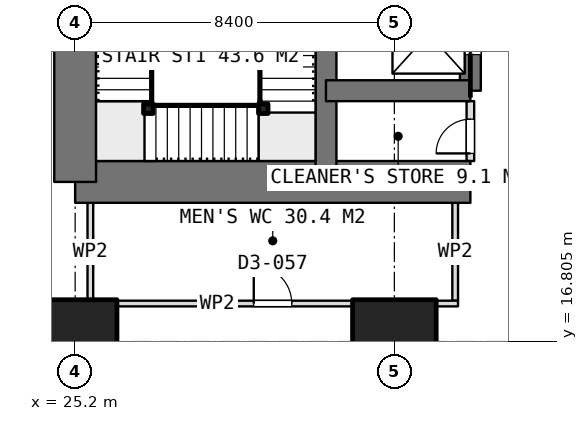
"""IFC4 building model, lengths in metres.
Left out: names, types, materials, properties, quantities, classifications, styles, units other than length and angle.
Written with IfcOpenShell. Run it as: python <this file> out.ifc"""

import sys

from ifc_helpers import new_model, si_unit, direction, frame, frame_2d, origin, origin_2d, place, context, subcontext, project, spatial, rectangle, extrude, element, fill, save


model = new_model("IFC4")
c1 = context("Model", 3, precision=1e-05, world=origin(), true_north=direction((0.0, 1.0)))
c2 = subcontext(c1, "Body", "Model", "MODEL_VIEW")
j1 = project(units=[si_unit("LENGTHUNIT", "METRE"), si_unit("PLANEANGLEUNIT", "RADIAN")], contexts=[c1])
p1 = place(None, origin())
s1 = spatial("IfcSite", under=j1, at=p1, CompositionType="ELEMENT")
p2 = place(p1, origin())
s2 = spatial("IfcBuilding", under=s1, at=p2, CompositionType="ELEMENT")
p3 = place(p2, frame((0.0, 0.0, 51.65)))
s3 = spatial("IfcBuildingStorey", under=s2, at=p3, CompositionType="ELEMENT", Elevation=51.65)
p4 = place(p3, frame((25.2, 21.0, 0.0), z_axis=(0.0, 0.0, 1.0), x_axis=(1.0, 0.0, 0.0)))
e1 = element("IfcWall", 1, at=p4, inside=s3, PredefinedType="SHEAR", context=c2, shape_type="SweptSolid", body=[
    extrude(rectangle(XDim=10.4, YDim=1.1, at=frame_2d((5.2, 0.0))), origin(), (0.0, 0.0, 1.0), 3.75),
])
p5 = place(p3, frame((25.2, 21.0, 0.0), z_axis=(0.0, 0.0, 1.0), x_axis=(0.0, 1.0, 0.0)))
e2 = element("IfcWall", 2, at=p5, inside=s3, PredefinedType="SHEAR", context=c2, shape_type="SweptSolid", body=[
    extrude(rectangle(XDim=25.2, YDim=1.1, at=frame_2d((12.6, 0.0))), origin(), (0.0, 0.0, 1.0), 3.75),
])
p6 = place(p5, frame((7.8, 0.0, 0.0)))
e3 = element("IfcOpeningElement", 3, at=p6, cuts=e2, PredefinedType="OPENING", context=c2, shape_type="SweptSolid", body=[
    extrude(rectangle(XDim=1.2, YDim=2.1, at=frame_2d((0.6, 1.05))), frame((0.0, 0.56, 0.0), z_axis=(0.0, -1.0, 0.0), x_axis=(1.0, 0.0, 0.0)), (0.0, 0.0, 1.0), 1.12),
])
p7 = place(p5, frame((14.25, 0.0, 0.0)))
e4 = element("IfcOpeningElement", 4, at=p7, cuts=e2, PredefinedType="OPENING", context=c2, shape_type="SweptSolid", body=[
    extrude(rectangle(XDim=0.9, YDim=2.1, at=frame_2d((0.45, 1.05))), frame((0.0, 0.56, 0.0), z_axis=(0.0, -1.0, 0.0), x_axis=(1.0, 0.0, 0.0)), (0.0, 0.0, 1.0), 1.12),
])
p8 = place(p5, frame((16.85, 0.0, 0.0)))
e5 = element("IfcOpeningElement", 5, at=p8, cuts=e2, PredefinedType="OPENING", context=c2, shape_type="SweptSolid", body=[
    extrude(rectangle(XDim=0.9, YDim=2.1, at=frame_2d((0.45, 1.05))), frame((0.0, 0.56, 0.0), z_axis=(0.0, -1.0, 0.0), x_axis=(1.0, 0.0, 0.0)), (0.0, 0.0, 1.0), 1.12),
])
p9 = place(p5, frame((19.075, 0.0, 0.0)))
e6 = element("IfcOpeningElement", 6, at=p9, cuts=e2, PredefinedType="OPENING", context=c2, shape_type="SweptSolid", body=[
    extrude(rectangle(XDim=1.2, YDim=2.1, at=frame_2d((0.6, 1.05))), frame((0.0, 0.56, 0.0), z_axis=(0.0, -1.0, 0.0), x_axis=(1.0, 0.0, 0.0)), (0.0, 0.0, 1.0), 1.12),
])
p10 = place(p3, frame((31.8, 21.0, 0.0), z_axis=(0.0, 0.0, 1.0), x_axis=(0.0, 1.0, 0.0)))
e7 = element("IfcWall", 7, at=p10, inside=s3, PredefinedType="SHEAR", context=c2, shape_type="SweptSolid", body=[
    extrude(rectangle(XDim=25.2, YDim=0.55, at=frame_2d((12.6, 0.0))), origin(), (0.0, 0.0, 1.0), 3.75),
])
p11 = place(p3, frame((35.6, 23.4, 0.0), z_axis=(0.0, 0.0, 1.0), x_axis=(0.0, 1.0, 0.0)))
e8 = element("IfcWall", 8, at=p11, inside=s3, PredefinedType="SHEAR", context=c2, shape_type="SweptSolid", body=[
    extrude(rectangle(XDim=18.0, YDim=0.55, at=frame_2d((9.0, 0.0))), origin(), (0.0, 0.0, 1.0), 3.75),
])
p12 = place(p11, frame((0.95, 0.0, 0.0)))
e9 = element("IfcOpeningElement", 9, at=p12, cuts=e8, PredefinedType="OPENING", context=c2, shape_type="SweptSolid", body=[
    extrude(rectangle(XDim=1.1, YDim=2.1, at=frame_2d((0.55, 1.05))), frame((0.0, 0.285, 0.0), z_axis=(0.0, -1.0, 0.0), x_axis=(1.0, 0.0, 0.0)), (0.0, 0.0, 1.0), 0.57),
])
p13 = place(p11, frame((3.95, 0.0, 0.0)))
e10 = element("IfcOpeningElement", 10, at=p13, cuts=e8, PredefinedType="OPENING", context=c2, shape_type="SweptSolid", body=[
    extrude(rectangle(XDim=1.1, YDim=2.1, at=frame_2d((0.55, 1.05))), frame((0.0, 0.285, 0.0), z_axis=(0.0, -1.0, 0.0), x_axis=(1.0, 0.0, 0.0)), (0.0, 0.0, 1.0), 0.57),
])
p14 = place(p11, frame((6.95, 0.0, 0.0)))
e11 = element("IfcOpeningElement", 11, at=p14, cuts=e8, PredefinedType="OPENING", context=c2, shape_type="SweptSolid", body=[
    extrude(rectangle(XDim=1.1, YDim=2.1, at=frame_2d((0.55, 1.05))), frame((0.0, 0.285, 0.0), z_axis=(0.0, -1.0, 0.0), x_axis=(1.0, 0.0, 0.0)), (0.0, 0.0, 1.0), 0.57),
])
p15 = place(p11, frame((9.95, 0.0, 0.0)))
e12 = element("IfcOpeningElement", 12, at=p15, cuts=e8, PredefinedType="OPENING", context=c2, shape_type="SweptSolid", body=[
    extrude(rectangle(XDim=1.1, YDim=2.1, at=frame_2d((0.55, 1.05))), frame((0.0, 0.285, 0.0), z_axis=(0.0, -1.0, 0.0), x_axis=(1.0, 0.0, 0.0)), (0.0, 0.0, 1.0), 0.57),
])
p16 = place(p11, frame((12.95, 0.0, 0.0)))
e13 = element("IfcOpeningElement", 13, at=p16, cuts=e8, PredefinedType="OPENING", context=c2, shape_type="SweptSolid", body=[
    extrude(rectangle(XDim=1.1, YDim=2.1, at=frame_2d((0.55, 1.05))), frame((0.0, 0.285, 0.0), z_axis=(0.0, -1.0, 0.0), x_axis=(1.0, 0.0, 0.0)), (0.0, 0.0, 1.0), 0.57),
])
p17 = place(p11, frame((15.95, 0.0, 0.0)))
e14 = element("IfcOpeningElement", 14, at=p17, cuts=e8, PredefinedType="OPENING", context=c2, shape_type="SweptSolid", body=[
    extrude(rectangle(XDim=1.1, YDim=2.1, at=frame_2d((0.55, 1.05))), frame((0.0, 0.285, 0.0), z_axis=(0.0, -1.0, 0.0), x_axis=(1.0, 0.0, 0.0)), (0.0, 0.0, 1.0), 0.57),
])
p18 = place(p3, frame((31.8, 23.4, 0.0), z_axis=(0.0, 0.0, 1.0), x_axis=(1.0, 0.0, 0.0)))
e15 = element("IfcWall", 15, at=p18, inside=s3, PredefinedType="SHEAR", context=c2, shape_type="SweptSolid", body=[
    extrude(rectangle(XDim=3.8, YDim=0.55, at=frame_2d((1.9, 0.0))), origin(), (0.0, 0.0, 1.0), 3.75),
])
for number, where, z_axis, x_axis in (
    (16, (25.2, 16.8, 0.0), (0.0, 0.0, 1.0), (1.0, 0.0, 0.0)),
    (17, (33.6, 16.8, 0.0), (0.0, 0.0, 1.0), (1.0, 0.0, 0.0)),
):
    element("IfcColumn", number, at=place(p3, frame(where, z_axis=z_axis, x_axis=x_axis)), inside=s3, PredefinedType="COLUMN", context=c2, shape_type="SweptSolid", body=[
        extrude(rectangle(XDim=2.2, YDim=2.2, at=origin_2d()), origin(), (0.0, 0.0, 1.0), 3.75),
    ])
p19 = place(p3, frame((35.6, 21.55, 0.0), z_axis=(0.0, 0.0, 1.0), x_axis=(0.0, 1.0, 0.0)))
e18 = element("IfcWall", 18, at=p19, inside=s3, PredefinedType="PARTITIONING", context=c2, shape_type="SweptSolid", body=[
    extrude(rectangle(XDim=1.575, YDim=0.2, at=frame_2d((0.788, 0.0))), origin(), (0.0, 0.0, 1.0), 3.5),
])
p20 = place(p19, frame((0.2, 0.0, 0.0)))
e19 = element("IfcOpeningElement", 19, at=p20, cuts=e18, PredefinedType="OPENING", context=c2, shape_type="SweptSolid", body=[
    extrude(rectangle(XDim=0.9, YDim=2.1, at=frame_2d((0.45, 1.05))), frame((0.0, 0.11, 0.0), z_axis=(0.0, -1.0, 0.0), x_axis=(1.0, 0.0, 0.0)), (0.0, 0.0, 1.0), 0.22),
])
p21 = place(p3, frame((25.525, 17.8, 0.0), z_axis=(0.0, 0.0, 1.0), x_axis=(1.0, 0.0, 0.0)))
e20 = element("IfcWall", 20, at=p21, inside=s3, PredefinedType="PARTITIONING", context=c2, shape_type="SweptSolid", body=[
    extrude(rectangle(XDim=9.75, YDim=0.15, at=frame_2d((4.875, 0.0))), origin(), (0.0, 0.0, 1.0), 3.5),
])
p22 = place(p21, frame((4.375, 0.0, 0.0)))
e21 = element("IfcOpeningElement", 21, at=p22, cuts=e20, PredefinedType="OPENING", context=c2, shape_type="SweptSolid", body=[
    extrude(rectangle(XDim=1.0, YDim=2.1, at=frame_2d((0.5, 1.05))), frame((0.0, 0.085, 0.0), z_axis=(0.0, -1.0, 0.0), x_axis=(1.0, 0.0, 0.0)), (0.0, 0.0, 1.0), 0.17),
])
for number, where, z_axis, x_axis in (
    (22, (25.6, 17.875, 0.0), (0.0, 0.0, 1.0), (0.0, 1.0, 0.0)),
    (23, (35.2, 17.875, 0.0), (0.0, 0.0, 1.0), (0.0, 1.0, 0.0)),
):
    element("IfcWall", number, at=place(p3, frame(where, z_axis=z_axis, x_axis=x_axis)), inside=s3, PredefinedType="PARTITIONING", context=c2, shape_type="SweptSolid", body=[
        extrude(rectangle(XDim=2.575, YDim=0.15, at=frame_2d((1.288, 0.0))), origin(), (0.0, 0.0, 1.0), 3.5),
    ])
for number, where, z_axis, x_axis in (
    (24, (30.15, 22.925, 0.0), (0.0, 0.0, 1.0), (1.0, 0.0, 0.0)),
    (25, (27.125, 22.925, 0.0), (0.0, 0.0, 1.0), (1.0, 0.0, 0.0)),
):
    element("IfcColumn", number, at=place(p3, frame(where, z_axis=z_axis, x_axis=x_axis)), inside=s3, PredefinedType="COLUMN", context=c2, shape_type="SweptSolid", body=[
        extrude(rectangle(XDim=0.25, YDim=0.25, at=origin_2d()), origin(), (0.0, 0.0, 1.0), 3.75),
    ])
p23 = place(p20, origin())
e26 = element("IfcDoor", 26, at=p23, inside=s3, OperationType="SINGLE_SWING_LEFT", PredefinedType="DOOR", context=c2, shape_type="SweptSolid", body=[
    extrude(rectangle(XDim=0.9, YDim=2.1, at=frame_2d((0.45, 1.05))), frame((0.0, 0.025, 0.0), z_axis=(0.0, -1.0, 0.0), x_axis=(1.0, 0.0, 0.0)), (0.0, 0.0, 1.0), 0.05),
])
fill(e19, e26)
p24 = place(p12, origin())
e27 = element("IfcDoor", 27, at=p24, inside=s3, OperationType="SLIDING_TO_LEFT", PredefinedType="USERDEFINED", context=c2, shape_type="SweptSolid", body=[
    extrude(rectangle(XDim=1.1, YDim=2.1, at=frame_2d((0.55, 1.05))), frame((0.0, 0.025, 0.0), z_axis=(0.0, -1.0, 0.0), x_axis=(1.0, 0.0, 0.0)), (0.0, 0.0, 1.0), 0.05),
])
fill(e9, e27)
p25 = place(p22, origin())
e28 = element("IfcDoor", 28, at=p25, inside=s3, OperationType="SINGLE_SWING_LEFT", PredefinedType="DOOR", context=c2, shape_type="SweptSolid", body=[
    extrude(rectangle(XDim=1.0, YDim=2.1, at=frame_2d((0.5, 1.05))), frame((0.0, 0.025, 0.0), z_axis=(0.0, -1.0, 0.0), x_axis=(1.0, 0.0, 0.0)), (0.0, 0.0, 1.0), 0.05),
])
fill(e21, e28)
save(model, sys.argv[1])
